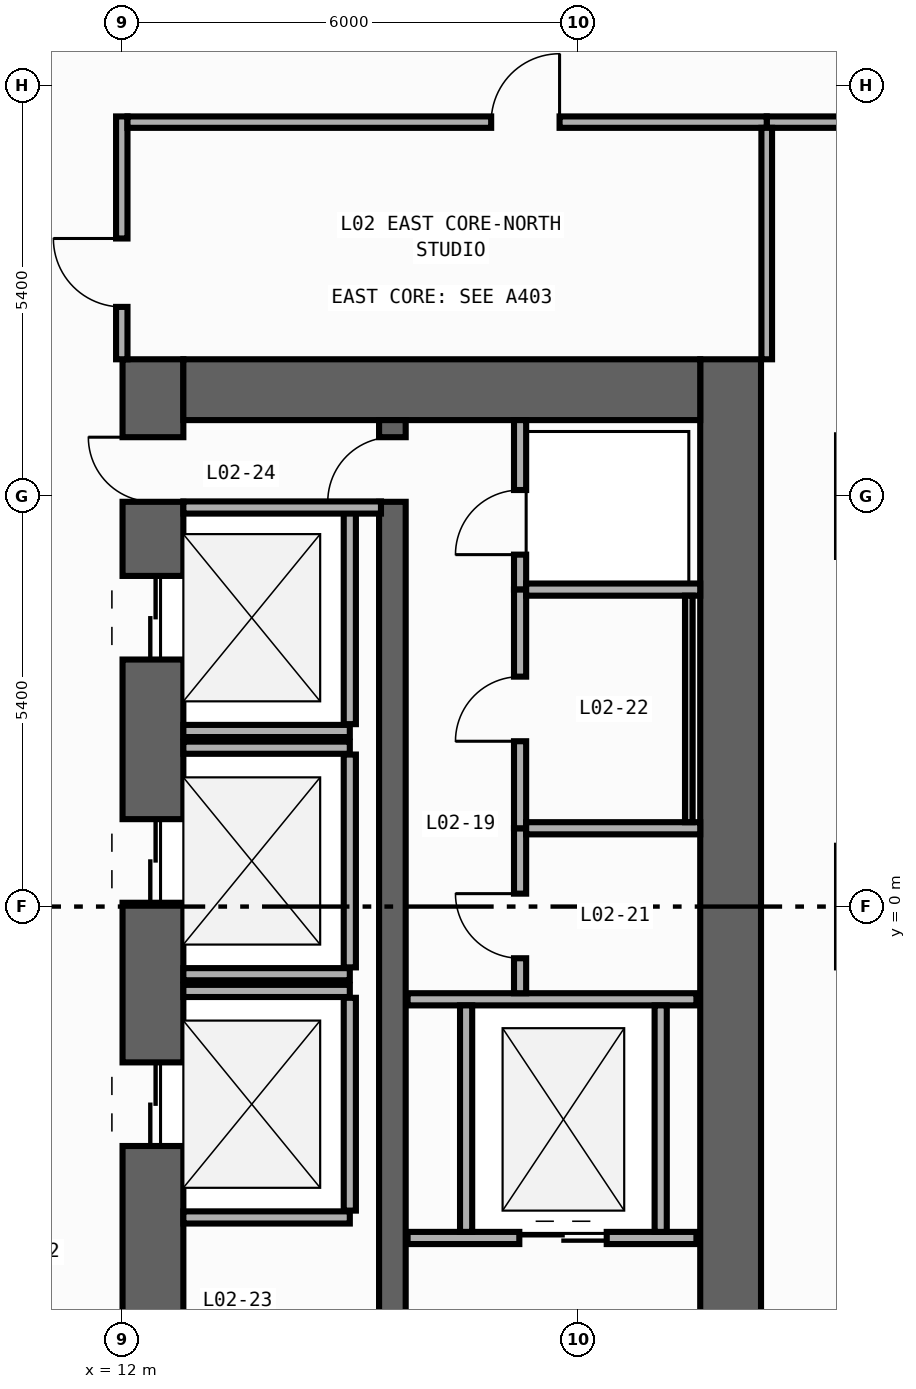
"""IFC4 building model, lengths in metres.
Left out: names, types, materials, properties, quantities, classifications, styles, units other than length and angle.
Written with IfcOpenShell. Run it as: python <this file> out.ifc"""

import sys

from ifc_helpers import new_model, si_unit, direction, frame, frame_2d, origin, place, context, subcontext, project, spatial, rectangle, extrude, element, fill, save


model = new_model("IFC4")
c1 = context("Model", 3, precision=1e-05, world=origin(), true_north=direction((0.0, 1.0)))
c2 = subcontext(c1, "Body", "Model", "MODEL_VIEW")
j1 = project(units=[si_unit("LENGTHUNIT", "METRE"), si_unit("PLANEANGLEUNIT", "RADIAN")], contexts=[c1])
p1 = place(None, origin())
s1 = spatial("IfcSite", under=j1, at=p1, CompositionType="ELEMENT")
p2 = place(p1, origin())
s2 = spatial("IfcBuilding", under=s1, at=p2, CompositionType="ELEMENT")
p3 = place(p2, frame((0.0, 0.0, 6.0)))
s3 = spatial("IfcBuildingStorey", under=s2, at=p3, CompositionType="ELEMENT", Elevation=6.0)
p4 = place(p3, frame((12.4, -19.8, 0.0), z_axis=(0.0, 0.0, 1.0), x_axis=(0.0, 1.0, 0.0)))
e1 = element("IfcWall", 1, at=p4, inside=s3, PredefinedType="SHEAR", context=c2, shape_type="SweptSolid", body=[
    extrude(rectangle(XDim=27.0, YDim=0.8, at=frame_2d((13.5, 0.0))), origin(), (0.0, 0.0, 1.0), 4.7),
])
p5 = place(p4, frame((23.05, 0.0, 0.0)))
e2 = element("IfcOpeningElement", 2, at=p5, cuts=e1, PredefinedType="OPENING", context=c2, shape_type="SweptSolid", body=[
    extrude(rectangle(XDim=1.1, YDim=2.2, at=frame_2d((0.55, 1.1))), frame((0.0, 0.41, 0.0), z_axis=(0.0, -1.0, 0.0), x_axis=(1.0, 0.0, 0.0)), (0.0, 0.0, 1.0), 0.82),
])
p6 = place(p4, frame((19.85, 0.0, 0.0)))
e3 = element("IfcOpeningElement", 3, at=p6, cuts=e1, PredefinedType="OPENING", context=c2, shape_type="SweptSolid", body=[
    extrude(rectangle(XDim=1.1, YDim=2.2, at=frame_2d((0.55, 1.1))), frame((0.0, 0.41, 0.0), z_axis=(0.0, -1.0, 0.0), x_axis=(1.0, 0.0, 0.0)), (0.0, 0.0, 1.0), 0.82),
])
p7 = place(p4, frame((16.65, 0.0, 0.0)))
e4 = element("IfcOpeningElement", 4, at=p7, cuts=e1, PredefinedType="OPENING", context=c2, shape_type="SweptSolid", body=[
    extrude(rectangle(XDim=1.1, YDim=2.2, at=frame_2d((0.55, 1.1))), frame((0.0, 0.41, 0.0), z_axis=(0.0, -1.0, 0.0), x_axis=(1.0, 0.0, 0.0)), (0.0, 0.0, 1.0), 0.82),
])
p8 = place(p4, frame((6.275, 0.0, 0.0)))
e5 = element("IfcOpeningElement", 5, at=p8, cuts=e1, PredefinedType="OPENING", context=c2, shape_type="SweptSolid", body=[
    extrude(rectangle(XDim=0.85, YDim=2.1, at=frame_2d((0.425, 1.05))), frame((0.0, 0.41, 0.0), z_axis=(0.0, -1.0, 0.0), x_axis=(1.0, 0.0, 0.0)), (0.0, 0.0, 1.0), 0.82),
])
p9 = place(p4, frame((8.575, 0.0, 0.0)))
e6 = element("IfcOpeningElement", 6, at=p9, cuts=e1, PredefinedType="OPENING", context=c2, shape_type="SweptSolid", body=[
    extrude(rectangle(XDim=0.85, YDim=2.1, at=frame_2d((0.425, 1.05))), frame((0.0, 0.41, 0.0), z_axis=(0.0, -1.0, 0.0), x_axis=(1.0, 0.0, 0.0)), (0.0, 0.0, 1.0), 0.82),
])
p10 = place(p4, frame((10.675, 0.0, 0.0)))
e7 = element("IfcOpeningElement", 7, at=p10, cuts=e1, PredefinedType="OPENING", context=c2, shape_type="SweptSolid", body=[
    extrude(rectangle(XDim=0.85, YDim=2.1, at=frame_2d((0.425, 1.05))), frame((0.0, 0.41, 0.0), z_axis=(0.0, -1.0, 0.0), x_axis=(1.0, 0.0, 0.0)), (0.0, 0.0, 1.0), 0.82),
])
p11 = place(p4, frame((12.725, 0.0, 0.0)))
e8 = element("IfcOpeningElement", 8, at=p11, cuts=e1, PredefinedType="OPENING", context=c2, shape_type="SweptSolid", body=[
    extrude(rectangle(XDim=1.15, YDim=2.2, at=frame_2d((0.575, 1.1))), frame((0.0, 0.41, 0.0), z_axis=(0.0, -1.0, 0.0), x_axis=(1.0, 0.0, 0.0)), (0.0, 0.0, 1.0), 0.82),
])
p12 = place(p4, frame((25.125, 0.0, 0.0)))
e9 = element("IfcOpeningElement", 9, at=p12, cuts=e1, PredefinedType="OPENING", context=c2, shape_type="SweptSolid", body=[
    extrude(rectangle(XDim=0.85, YDim=2.1, at=frame_2d((0.425, 1.05))), frame((0.0, 0.41, 0.0), z_axis=(0.0, -1.0, 0.0), x_axis=(1.0, 0.0, 0.0)), (0.0, 0.0, 1.0), 0.82),
])
p13 = place(p3, frame((20.0, -19.8, 0.0), z_axis=(0.0, 0.0, 1.0), x_axis=(0.0, 1.0, 0.0)))
e10 = element("IfcWall", 10, at=p13, inside=s3, PredefinedType="SHEAR", context=c2, shape_type="SweptSolid", body=[
    extrude(rectangle(XDim=27.0, YDim=0.8, at=frame_2d((13.5, 0.0))), origin(), (0.0, 0.0, 1.0), 4.7),
])
p14 = place(p3, frame((12.8, 6.8, 0.0), z_axis=(0.0, 0.0, 1.0), x_axis=(1.0, 0.0, 0.0)))
e11 = element("IfcWall", 11, at=p14, inside=s3, PredefinedType="SHEAR", context=c2, shape_type="SweptSolid", body=[
    extrude(rectangle(XDim=6.8, YDim=0.8, at=frame_2d((3.4, 0.0))), origin(), (0.0, 0.0, 1.0), 4.7),
])
p15 = place(p3, frame((15.55, -19.0, 0.0), z_axis=(0.0, 0.0, 1.0), x_axis=(0.0, 1.0, 0.0)))
e12 = element("IfcWall", 12, at=p15, inside=s3, PredefinedType="SHEAR", context=c2, shape_type="SweptSolid", body=[
    extrude(rectangle(XDim=25.4, YDim=0.35, at=frame_2d((12.7, 0.0))), origin(), (0.0, 0.0, 1.0), 4.7),
])
p16 = place(p15, frame((11.925, 0.0, 0.0)))
e13 = element("IfcOpeningElement", 13, at=p16, cuts=e12, PredefinedType="OPENING", context=c2, shape_type="SweptSolid", body=[
    extrude(rectangle(XDim=1.15, YDim=2.2, at=frame_2d((0.575, 1.1))), frame((0.0, 0.185, 0.0), z_axis=(0.0, -1.0, 0.0), x_axis=(1.0, 0.0, 0.0)), (0.0, 0.0, 1.0), 0.37),
])
p17 = place(p15, frame((24.325, 0.0, 0.0)))
e14 = element("IfcOpeningElement", 14, at=p17, cuts=e12, PredefinedType="OPENING", context=c2, shape_type="SweptSolid", body=[
    extrude(rectangle(XDim=0.85, YDim=2.1, at=frame_2d((0.425, 1.05))), frame((0.0, 0.185, 0.0), z_axis=(0.0, -1.0, 0.0), x_axis=(1.0, 0.0, 0.0)), (0.0, 0.0, 1.0), 0.37),
])
p18 = place(p3, frame((12.8, 2.31, 0.0), z_axis=(0.0, 0.0, 1.0), x_axis=(1.0, 0.0, 0.0)))
e15 = element("IfcWall", 15, at=p18, inside=s3, PredefinedType="STANDARD", context=c2, shape_type="SweptSolid", body=[
    extrude(rectangle(XDim=2.19, YDim=0.16, at=frame_2d((1.095, 0.0))), origin(), (0.0, 0.0, 1.0), 4.7),
])
p19 = place(p3, frame((14.99, 2.4, 0.0), z_axis=(0.0, 0.0, 1.0), x_axis=(0.0, 1.0, 0.0)))
e16 = element("IfcWall", 16, at=p19, inside=s3, PredefinedType="STANDARD", context=c2, shape_type="SweptSolid", body=[
    extrude(rectangle(XDim=2.8, YDim=0.16, at=frame_2d((1.4, 0.0))), origin(), (0.0, 0.0, 1.0), 4.7),
])
for number, where, z_axis, x_axis in (
    (17, (12.8, -0.89, 0.0), (0.0, 0.0, 1.0), (1.0, 0.0, 0.0)),
    (18, (12.8, 2.09, 0.0), (0.0, 0.0, 1.0), (1.0, 0.0, 0.0)),
):
    element("IfcWall", number, at=place(p3, frame(where, z_axis=z_axis, x_axis=x_axis)), inside=s3, PredefinedType="STANDARD", context=c2, shape_type="SweptSolid", body=[
        extrude(rectangle(XDim=2.19, YDim=0.16, at=frame_2d((1.095, 0.0))), origin(), (0.0, 0.0, 1.0), 4.7),
    ])
p20 = place(p3, frame((14.99, -0.8, 0.0), z_axis=(0.0, 0.0, 1.0), x_axis=(0.0, 1.0, 0.0)))
e19 = element("IfcWall", 19, at=p20, inside=s3, PredefinedType="STANDARD", context=c2, shape_type="SweptSolid", body=[
    extrude(rectangle(XDim=2.8, YDim=0.16, at=frame_2d((1.4, 0.0))), origin(), (0.0, 0.0, 1.0), 4.7),
])
for number, where, z_axis, x_axis in (
    (20, (12.8, -4.09, 0.0), (0.0, 0.0, 1.0), (1.0, 0.0, 0.0)),
    (21, (12.8, -1.11, 0.0), (0.0, 0.0, 1.0), (1.0, 0.0, 0.0)),
):
    element("IfcWall", number, at=place(p3, frame(where, z_axis=z_axis, x_axis=x_axis)), inside=s3, PredefinedType="STANDARD", context=c2, shape_type="SweptSolid", body=[
        extrude(rectangle(XDim=2.19, YDim=0.16, at=frame_2d((1.095, 0.0))), origin(), (0.0, 0.0, 1.0), 4.7),
    ])
p21 = place(p3, frame((14.99, -4.0, 0.0), z_axis=(0.0, 0.0, 1.0), x_axis=(0.0, 1.0, 0.0)))
e22 = element("IfcWall", 22, at=p21, inside=s3, PredefinedType="STANDARD", context=c2, shape_type="SweptSolid", body=[
    extrude(rectangle(XDim=2.8, YDim=0.16, at=frame_2d((1.4, 0.0))), origin(), (0.0, 0.0, 1.0), 4.7),
])
p22 = place(p3, frame((15.75, -4.36, 0.0), z_axis=(0.0, 0.0, 1.0), x_axis=(1.0, 0.0, 0.0)))
e23 = element("IfcWall", 23, at=p22, inside=s3, PredefinedType="STANDARD", context=c2, shape_type="SweptSolid", body=[
    extrude(rectangle(XDim=3.8, YDim=0.16, at=frame_2d((1.9, 0.0))), origin(), (0.0, 0.0, 1.0), 4.7),
])
p23 = place(p22, frame((1.47, 0.0, 0.0)))
e24 = element("IfcOpeningElement", 24, at=p23, cuts=e23, PredefinedType="OPENING", context=c2, shape_type="SweptSolid", body=[
    extrude(rectangle(XDim=1.15, YDim=2.2, at=frame_2d((0.575, 1.1))), frame((0.0, 0.09, 0.0), z_axis=(0.0, -1.0, 0.0), x_axis=(1.0, 0.0, 0.0)), (0.0, 0.0, 1.0), 0.18),
])
p24 = place(p3, frame((15.75, -1.22, 0.0), z_axis=(0.0, 0.0, 1.0), x_axis=(1.0, 0.0, 0.0)))
e25 = element("IfcWall", 25, at=p24, inside=s3, PredefinedType="STANDARD", context=c2, shape_type="SweptSolid", body=[
    extrude(rectangle(XDim=3.8, YDim=0.16, at=frame_2d((1.9, 0.0))), origin(), (0.0, 0.0, 1.0), 4.7),
])
for number, where, z_axis, x_axis in (
    (26, (16.52, -4.28, 0.0), (0.0, 0.0, 1.0), (0.0, 1.0, 0.0)),
    (27, (19.08, -4.28, 0.0), (0.0, 0.0, 1.0), (0.0, 1.0, 0.0)),
):
    element("IfcWall", number, at=place(p3, frame(where, z_axis=z_axis, x_axis=x_axis)), inside=s3, PredefinedType="STANDARD", context=c2, shape_type="SweptSolid", body=[
        extrude(rectangle(XDim=2.98, YDim=0.16, at=frame_2d((1.49, 0.0))), origin(), (0.0, 0.0, 1.0), 4.7),
    ])
p25 = place(p3, frame((12.8, 5.25, 0.0), z_axis=(0.0, 0.0, 1.0), x_axis=(1.0, 0.0, 0.0)))
e28 = element("IfcWall", 28, at=p25, inside=s3, PredefinedType="STANDARD", context=c2, shape_type="SweptSolid", body=[
    extrude(rectangle(XDim=2.6, YDim=0.16, at=frame_2d((1.3, 0.0))), origin(), (0.0, 0.0, 1.0), 4.7),
])
p26 = place(p3, frame((17.23, 4.17, 0.0), z_axis=(0.0, 0.0, 1.0), x_axis=(0.0, 1.0, 0.0)))
e29 = element("IfcWall", 29, at=p26, inside=s3, PredefinedType="PARTITIONING", context=c2, shape_type="SweptSolid", body=[
    extrude(rectangle(XDim=2.23, YDim=0.16, at=frame_2d((1.115, 0.0))), origin(), (0.0, 0.0, 1.0), 4.7),
])
p27 = place(p26, frame((0.46, 0.0, 0.0)))
e30 = element("IfcOpeningElement", 30, at=p27, cuts=e29, PredefinedType="OPENING", context=c2, shape_type="SweptSolid", body=[
    extrude(rectangle(XDim=0.85, YDim=2.1, at=frame_2d((0.425, 1.05))), frame((0.0, 0.09, 0.0), z_axis=(0.0, -1.0, 0.0), x_axis=(1.0, 0.0, 0.0)), (0.0, 0.0, 1.0), 0.18),
])
p28 = place(p3, frame((17.23, -1.14, 0.0), z_axis=(0.0, 0.0, 1.0), x_axis=(0.0, 1.0, 0.0)))
e31 = element("IfcWall", 31, at=p28, inside=s3, PredefinedType="PARTITIONING", context=c2, shape_type="SweptSolid", body=[
    extrude(rectangle(XDim=2.17, YDim=0.16, at=frame_2d((1.085, 0.0))), origin(), (0.0, 0.0, 1.0), 4.7),
])
p29 = place(p28, frame((0.46, 0.0, 0.0)))
e32 = element("IfcOpeningElement", 32, at=p29, cuts=e31, PredefinedType="OPENING", context=c2, shape_type="SweptSolid", body=[
    extrude(rectangle(XDim=0.85, YDim=2.1, at=frame_2d((0.425, 1.05))), frame((0.0, 0.09, 0.0), z_axis=(0.0, -1.0, 0.0), x_axis=(1.0, 0.0, 0.0)), (0.0, 0.0, 1.0), 0.18),
])
p30 = place(p3, frame((17.23, 1.03, 0.0), z_axis=(0.0, 0.0, 1.0), x_axis=(0.0, 1.0, 0.0)))
e33 = element("IfcWall", 33, at=p30, inside=s3, PredefinedType="PARTITIONING", context=c2, shape_type="SweptSolid", body=[
    extrude(rectangle(XDim=3.14, YDim=0.16, at=frame_2d((1.57, 0.0))), origin(), (0.0, 0.0, 1.0), 4.7),
])
p31 = place(p30, frame((1.145, 0.0, 0.0)))
e34 = element("IfcOpeningElement", 34, at=p31, cuts=e33, PredefinedType="OPENING", context=c2, shape_type="SweptSolid", body=[
    extrude(rectangle(XDim=0.85, YDim=2.1, at=frame_2d((0.425, 1.05))), frame((0.0, 0.09, 0.0), z_axis=(0.0, -1.0, 0.0), x_axis=(1.0, 0.0, 0.0)), (0.0, 0.0, 1.0), 0.18),
])
for number, where, z_axis, x_axis in (
    (35, (17.31, 4.17, 0.0), (0.0, 0.0, 1.0), (1.0, 0.0, 0.0)),
    (36, (17.31, 1.03, 0.0), (0.0, 0.0, 1.0), (1.0, 0.0, 0.0)),
):
    element("IfcWall", number, at=place(p3, frame(where, z_axis=z_axis, x_axis=x_axis)), inside=s3, PredefinedType="PARTITIONING", context=c2, shape_type="SweptSolid", body=[
        extrude(rectangle(XDim=2.29, YDim=0.16, at=frame_2d((1.145, 0.0))), origin(), (0.0, 0.0, 1.0), 4.7),
    ])
p32 = place(p3, frame((11.99, 7.2, 0.0), z_axis=(0.0, 0.0, 1.0), x_axis=(0.0, 1.0, 0.0)))
e37 = element("IfcWall", 37, at=p32, inside=s3, PredefinedType="PARTITIONING", context=c2, shape_type="SweptSolid", body=[
    extrude(rectangle(XDim=3.195, YDim=0.15, at=frame_2d((1.598, 0.0))), origin(), (0.0, 0.0, 1.0), 4.7),
])
p33 = place(p32, frame((0.689, 0.0, 0.0)))
e38 = element("IfcOpeningElement", 38, at=p33, cuts=e37, PredefinedType="OPENING", context=c2, shape_type="SweptSolid", body=[
    extrude(rectangle(XDim=0.9, YDim=2.15, at=frame_2d((0.45, 1.075))), frame((0.0, 0.085, 0.0), z_axis=(0.0, -1.0, 0.0), x_axis=(1.0, 0.0, 0.0)), (0.0, 0.0, 1.0), 0.17),
])
p34 = place(p3, frame((20.475, 10.32, 0.0), z_axis=(0.0, 0.0, 1.0), x_axis=(1.0, 0.0, 0.0)))
e39 = element("IfcWall", 39, at=p34, inside=s3, PredefinedType="PARTITIONING", context=c2, shape_type="SweptSolid", body=[
    extrude(rectangle(XDim=3.97, YDim=0.15, at=frame_2d((1.985, 0.0))), origin(), (0.0, 0.0, 1.0), 4.7),
])
p35 = place(p34, frame((2.61, 0.0, 0.0)))
e40 = element("IfcOpeningElement", 40, at=p35, cuts=e39, PredefinedType="OPENING", context=c2, shape_type="SweptSolid", body=[
    extrude(rectangle(XDim=0.9, YDim=2.15, at=frame_2d((0.45, 1.075))), frame((0.0, 0.085, 0.0), z_axis=(0.0, -1.0, 0.0), x_axis=(1.0, 0.0, 0.0)), (0.0, 0.0, 1.0), 0.17),
])
p36 = place(p3, frame((12.065, 10.32, 0.0), z_axis=(0.0, 0.0, 1.0), x_axis=(1.0, 0.0, 0.0)))
e41 = element("IfcWall", 41, at=p36, inside=s3, PredefinedType="PARTITIONING", context=c2, shape_type="SweptSolid", body=[
    extrude(rectangle(XDim=8.41, YDim=0.15, at=frame_2d((4.205, 0.0))), origin(), (0.0, 0.0, 1.0), 4.7),
])
p37 = place(p36, frame((4.785, 0.0, 0.0)))
e42 = element("IfcOpeningElement", 42, at=p37, cuts=e41, PredefinedType="OPENING", context=c2, shape_type="SweptSolid", body=[
    extrude(rectangle(XDim=0.9, YDim=2.15, at=frame_2d((0.45, 1.075))), frame((0.0, 0.085, 0.0), z_axis=(0.0, -1.0, 0.0), x_axis=(1.0, 0.0, 0.0)), (0.0, 0.0, 1.0), 0.17),
])
p38 = place(p3, frame((20.475, 7.2, 0.0), z_axis=(0.0, 0.0, 1.0), x_axis=(0.0, 1.0, 0.0)))
e43 = element("IfcWall", 43, at=p38, inside=s3, PredefinedType="PARTITIONING", context=c2, shape_type="SweptSolid", body=[
    extrude(rectangle(XDim=3.045, YDim=0.14, at=frame_2d((1.522, 0.0))), origin(), (0.0, 0.0, 1.0), 4.7),
])
p39 = place(p3, frame((19.45, 4.09, 0.0), z_axis=(0.0, 0.0, 1.0), x_axis=(0.0, -1.0, 0.0)))
e44 = element("IfcWall", 44, at=p39, inside=s3, PredefinedType="PARTITIONING", context=c2, shape_type="SweptSolid", body=[
    extrude(rectangle(XDim=2.98, YDim=0.1, at=frame_2d((1.49, 0.0))), origin(), (0.0, 0.0, 1.0), 4.7),
])
p40 = place(p5, origin())
e45 = element("IfcDoor", 45, at=p40, inside=s3, OperationType="DOUBLE_DOOR_SLIDING", PredefinedType="DOOR", context=c2, shape_type="SweptSolid", body=[
    extrude(rectangle(XDim=1.1, YDim=2.2, at=frame_2d((0.55, 1.1))), frame((0.0, 0.025, 0.0), z_axis=(0.0, -1.0, 0.0), x_axis=(1.0, 0.0, 0.0)), (0.0, 0.0, 1.0), 0.05),
])
fill(e2, e45)
p41 = place(p6, origin())
e46 = element("IfcDoor", 46, at=p41, inside=s3, OperationType="DOUBLE_DOOR_SLIDING", PredefinedType="DOOR", context=c2, shape_type="SweptSolid", body=[
    extrude(rectangle(XDim=1.1, YDim=2.2, at=frame_2d((0.55, 1.1))), frame((0.0, 0.025, 0.0), z_axis=(0.0, -1.0, 0.0), x_axis=(1.0, 0.0, 0.0)), (0.0, 0.0, 1.0), 0.05),
])
fill(e3, e46)
p42 = place(p7, origin())
e47 = element("IfcDoor", 47, at=p42, inside=s3, OperationType="DOUBLE_DOOR_SLIDING", PredefinedType="DOOR", context=c2, shape_type="SweptSolid", body=[
    extrude(rectangle(XDim=1.1, YDim=2.2, at=frame_2d((0.55, 1.1))), frame((0.0, 0.025, 0.0), z_axis=(0.0, -1.0, 0.0), x_axis=(1.0, 0.0, 0.0)), (0.0, 0.0, 1.0), 0.05),
])
fill(e4, e47)
p43 = place(p12, origin())
e48 = element("IfcDoor", 48, at=p43, inside=s3, OperationType="SINGLE_SWING_RIGHT", PredefinedType="DOOR", context=c2, shape_type="SweptSolid", body=[
    extrude(rectangle(XDim=0.85, YDim=2.1, at=frame_2d((0.425, 1.05))), frame((0.0, 0.025, 0.0), z_axis=(0.0, -1.0, 0.0), x_axis=(1.0, 0.0, 0.0)), (0.0, 0.0, 1.0), 0.05),
])
fill(e9, e48)
p44 = place(p17, origin())
e49 = element("IfcDoor", 49, at=p44, inside=s3, OperationType="SINGLE_SWING_LEFT", PredefinedType="DOOR", context=c2, shape_type="SweptSolid", body=[
    extrude(rectangle(XDim=0.85, YDim=2.1, at=frame_2d((0.425, 1.05))), frame((0.0, 0.025, 0.0), z_axis=(0.0, -1.0, 0.0), x_axis=(1.0, 0.0, 0.0)), (0.0, 0.0, 1.0), 0.05),
])
fill(e14, e49)
p45 = place(p23, origin())
e50 = element("IfcDoor", 50, at=p45, inside=s3, OperationType="DOUBLE_DOOR_SLIDING", PredefinedType="DOOR", context=c2, shape_type="SweptSolid", body=[
    extrude(rectangle(XDim=1.15, YDim=2.2, at=frame_2d((0.575, 1.1))), frame((0.0, 0.025, 0.0), z_axis=(0.0, -1.0, 0.0), x_axis=(1.0, 0.0, 0.0)), (0.0, 0.0, 1.0), 0.05),
])
fill(e24, e50)
p46 = place(p27, origin())
e51 = element("IfcDoor", 51, at=p46, inside=s3, OperationType="SINGLE_SWING_LEFT", PredefinedType="DOOR", context=c2, shape_type="SweptSolid", body=[
    extrude(rectangle(XDim=0.85, YDim=2.1, at=frame_2d((0.425, 1.05))), frame((0.0, 0.025, 0.0), z_axis=(0.0, -1.0, 0.0), x_axis=(1.0, 0.0, 0.0)), (0.0, 0.0, 1.0), 0.05),
])
fill(e30, e51)
p47 = place(p29, origin())
e52 = element("IfcDoor", 52, at=p47, inside=s3, OperationType="SINGLE_SWING_RIGHT", PredefinedType="DOOR", context=c2, shape_type="SweptSolid", body=[
    extrude(rectangle(XDim=0.85, YDim=2.1, at=frame_2d((0.425, 1.05))), frame((0.0, 0.025, 0.0), z_axis=(0.0, -1.0, 0.0), x_axis=(1.0, 0.0, 0.0)), (0.0, 0.0, 1.0), 0.05),
])
fill(e32, e52)
p48 = place(p31, origin())
e53 = element("IfcDoor", 53, at=p48, inside=s3, OperationType="SINGLE_SWING_LEFT", PredefinedType="DOOR", context=c2, shape_type="SweptSolid", body=[
    extrude(rectangle(XDim=0.85, YDim=2.1, at=frame_2d((0.425, 1.05))), frame((0.0, 0.025, 0.0), z_axis=(0.0, -1.0, 0.0), x_axis=(1.0, 0.0, 0.0)), (0.0, 0.0, 1.0), 0.05),
])
fill(e34, e53)
p49 = place(p33, origin())
e54 = element("IfcDoor", 54, at=p49, inside=s3, OperationType="SINGLE_SWING_RIGHT", PredefinedType="DOOR", context=c2, shape_type="SweptSolid", body=[
    extrude(rectangle(XDim=0.9, YDim=2.15, at=frame_2d((0.45, 1.075))), frame((0.0, 0.025, 0.0), z_axis=(0.0, -1.0, 0.0), x_axis=(1.0, 0.0, 0.0)), (0.0, 0.0, 1.0), 0.05),
])
fill(e38, e54)
p50 = place(p37, origin())
e55 = element("IfcDoor", 55, at=p50, inside=s3, OperationType="SINGLE_SWING_RIGHT", PredefinedType="DOOR", context=c2, shape_type="SweptSolid", body=[
    extrude(rectangle(XDim=0.9, YDim=2.15, at=frame_2d((0.45, 1.075))), frame((0.0, 0.025, 0.0), z_axis=(0.0, -1.0, 0.0), x_axis=(1.0, 0.0, 0.0)), (0.0, 0.0, 1.0), 0.05),
])
fill(e42, e55)
save(model, sys.argv[1])
